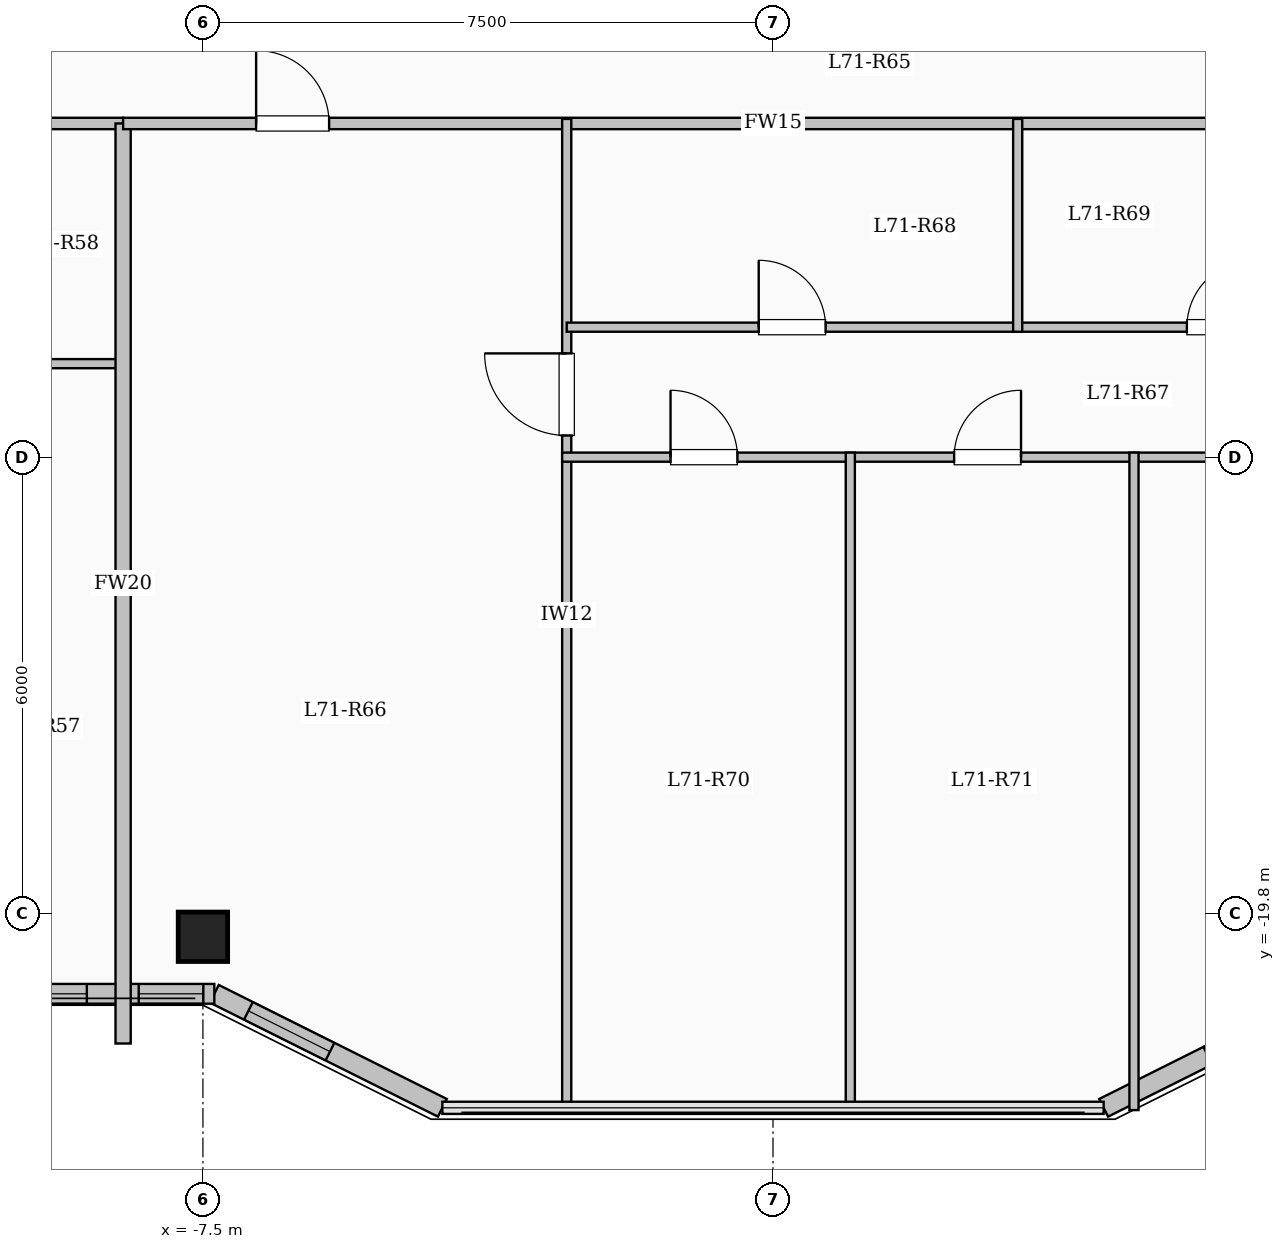
"""IFC4 building model, lengths in metres.
Left out: names, types, materials, properties, quantities, classifications, styles, units other than length and angle.
Written with IfcOpenShell. Run it as: python <this file> out.ifc"""

import sys

from ifc_helpers import new_model, si_unit, direction, frame, frame_2d, origin, origin_2d, place, context, subcontext, project, spatial, rectangle, extrude, element, fill, save


model = new_model("IFC4")
c1 = context("Model", 3, precision=1e-05, world=origin(), true_north=direction((0.0, 1.0)))
c2 = subcontext(c1, "Body", "Model", "MODEL_VIEW")
j1 = project(units=[si_unit("LENGTHUNIT", "METRE"), si_unit("PLANEANGLEUNIT", "RADIAN")], contexts=[c1])
p1 = place(None, origin())
s1 = spatial("IfcSite", under=j1, at=p1, CompositionType="ELEMENT")
p2 = place(p1, origin())
s2 = spatial("IfcBuilding", under=s1, at=p2, CompositionType="ELEMENT")
p3 = place(p2, frame((0.0, 0.0, 261.6)))
s3 = spatial("IfcBuildingStorey", under=s2, at=p3, CompositionType="ELEMENT", Elevation=261.6)
p4 = place(p3, frame((-7.5, -20.1, 0.0), z_axis=(0.0, 0.0, 1.0), x_axis=(1.0, 0.0, 0.0)))
e1 = element("IfcColumn", 1, at=p4, inside=s3, PredefinedType="COLUMN", context=c2, shape_type="SweptSolid", body=[
    extrude(rectangle(XDim=0.65, YDim=0.65, at=origin_2d()), origin(), (0.0, 0.0, 1.0), 3.35),
])
p5 = place(p3, frame((7.35, -20.85, 0.0), z_axis=(0.0, 0.0, 1.0), x_axis=(-0.894427191, -0.4472135955, 0.0)))
e2 = element("IfcWall", 2, at=p5, inside=s3, PredefinedType="SOLIDWALL", context=c2, shape_type="SweptSolid", body=[
    extrude(rectangle(XDim=3.354, YDim=0.26, at=frame_2d((1.677, 0.0))), origin(), (0.0, 0.0, 1.0), 3.1),
])
p6 = place(p5, frame((0.622, 0.0, 0.95)))
e3 = element("IfcOpeningElement", 3, at=p6, cuts=e2, PredefinedType="OPENING", context=c2, shape_type="SweptSolid", body=[
    extrude(rectangle(XDim=1.2, YDim=1.5, at=frame_2d((0.6, 0.75))), frame((0.0, 0.14, 0.0), z_axis=(0.0, -1.0, 0.0), x_axis=(1.0, 0.0, 0.0)), (0.0, 0.0, 1.0), 0.28),
])
p7 = place(p3, frame((-4.35, -22.35, 0.0), z_axis=(0.0, 0.0, 1.0), x_axis=(-0.894427191, 0.4472135955, 0.0)))
e4 = element("IfcWall", 4, at=p7, inside=s3, PredefinedType="SOLIDWALL", context=c2, shape_type="SweptSolid", body=[
    extrude(rectangle(XDim=3.354, YDim=0.26, at=frame_2d((1.677, 0.0))), origin(), (0.0, 0.0, 1.0), 3.1),
])
p8 = place(p7, frame((1.653, 0.0, 0.95)))
e5 = element("IfcOpeningElement", 5, at=p8, cuts=e4, PredefinedType="OPENING", context=c2, shape_type="SweptSolid", body=[
    extrude(rectangle(XDim=1.2, YDim=1.5, at=frame_2d((0.6, 0.75))), frame((0.0, 0.14, 0.0), z_axis=(0.0, -1.0, 0.0), x_axis=(1.0, 0.0, 0.0)), (0.0, 0.0, 1.0), 0.28),
])
p9 = place(p3, frame((-7.35, -20.85, 0.0), z_axis=(0.0, 0.0, 1.0), x_axis=(-1.0, 0.0, 0.0)))
e6 = element("IfcWall", 6, at=p9, inside=s3, PredefinedType="SOLIDWALL", context=c2, shape_type="SweptSolid", body=[
    extrude(rectangle(XDim=10.5, YDim=0.26, at=frame_2d((5.25, 0.0))), origin(), (0.0, 0.0, 1.0), 3.1),
])
p10 = place(p9, frame((0.145, 0.0, 0.95)))
e7 = element("IfcOpeningElement", 7, at=p10, cuts=e6, PredefinedType="OPENING", context=c2, shape_type="SweptSolid", body=[
    extrude(rectangle(XDim=0.85, YDim=1.5, at=frame_2d((0.425, 0.75))), frame((0.0, 0.14, 0.0), z_axis=(0.0, -1.0, 0.0), x_axis=(1.0, 0.0, 0.0)), (0.0, 0.0, 1.0), 0.28),
])
p11 = place(p9, frame((1.677, 0.0, 0.95)))
e8 = element("IfcOpeningElement", 8, at=p11, cuts=e6, PredefinedType="OPENING", context=c2, shape_type="SweptSolid", body=[
    extrude(rectangle(XDim=1.2, YDim=1.5, at=frame_2d((0.6, 0.75))), frame((0.0, 0.14, 0.0), z_axis=(0.0, -1.0, 0.0), x_axis=(1.0, 0.0, 0.0)), (0.0, 0.0, 1.0), 0.28),
])
p12 = place(p9, frame((4.0, 0.0, 0.95)))
e9 = element("IfcOpeningElement", 9, at=p12, cuts=e6, PredefinedType="OPENING", context=c2, shape_type="SweptSolid", body=[
    extrude(rectangle(XDim=1.2, YDim=1.5, at=frame_2d((0.6, 0.75))), frame((0.0, 0.14, 0.0), z_axis=(0.0, -1.0, 0.0), x_axis=(1.0, 0.0, 0.0)), (0.0, 0.0, 1.0), 0.28),
])
p13 = place(p9, frame((6.302, 0.0, 0.95)))
e10 = element("IfcOpeningElement", 10, at=p13, cuts=e6, PredefinedType="OPENING", context=c2, shape_type="SweptSolid", body=[
    extrude(rectangle(XDim=1.2, YDim=1.5, at=frame_2d((0.6, 0.75))), frame((0.0, 0.14, 0.0), z_axis=(0.0, -1.0, 0.0), x_axis=(1.0, 0.0, 0.0)), (0.0, 0.0, 1.0), 0.28),
])
p14 = place(p9, frame((8.575, 0.0, 0.95)))
e11 = element("IfcOpeningElement", 11, at=p14, cuts=e6, PredefinedType="OPENING", context=c2, shape_type="SweptSolid", body=[
    extrude(rectangle(XDim=1.2, YDim=1.5, at=frame_2d((0.6, 0.75))), frame((0.0, 0.14, 0.0), z_axis=(0.0, -1.0, 0.0), x_axis=(1.0, 0.0, 0.0)), (0.0, 0.0, 1.0), 0.28),
])
p15 = place(p3, frame((-17.75, -9.4, 0.0), z_axis=(0.0, 0.0, 1.0), x_axis=(1.0, 0.0, 0.0)))
e12 = element("IfcWall", 12, at=p15, inside=s3, PredefinedType="PARTITIONING", context=c2, shape_type="SweptSolid", body=[
    extrude(rectangle(XDim=9.2, YDim=0.15, at=frame_2d((4.6, 0.0))), origin(), (0.0, 0.0, 1.0), 3.1),
])
p16 = place(p15, frame((0.7, 0.0, 0.0)))
e13 = element("IfcOpeningElement", 13, at=p16, cuts=e12, PredefinedType="OPENING", context=c2, shape_type="SweptSolid", body=[
    extrude(rectangle(XDim=0.96, YDim=2.15, at=frame_2d((0.48, 1.075))), frame((0.0, 0.085, 0.0), z_axis=(0.0, -1.0, 0.0), x_axis=(1.0, 0.0, 0.0)), (0.0, 0.0, 1.0), 0.17),
])
p17 = place(p15, frame((5.275, 0.0, 0.0)))
e14 = element("IfcOpeningElement", 14, at=p17, cuts=e12, PredefinedType="OPENING", context=c2, shape_type="SweptSolid", body=[
    extrude(rectangle(XDim=0.96, YDim=2.15, at=frame_2d((0.48, 1.075))), frame((0.0, 0.085, 0.0), z_axis=(0.0, -1.0, 0.0), x_axis=(1.0, 0.0, 0.0)), (0.0, 0.0, 1.0), 0.17),
])
p18 = place(p3, frame((-10.775, -12.56, 0.0), z_axis=(0.0, 0.0, 1.0), x_axis=(1.0, 0.0, 0.0)))
e15 = element("IfcWall", 15, at=p18, inside=s3, PredefinedType="PARTITIONING", context=c2, shape_type="SweptSolid", body=[
    extrude(rectangle(XDim=2.235, YDim=0.12, at=frame_2d((1.117, 0.0))), origin(), (0.0, 0.0, 1.0), 2.785),
])
p19 = place(p3, frame((-8.55, -21.504, 0.0), z_axis=(0.0, 0.0, 1.0), x_axis=(0.0, 1.0, 0.0)))
e16 = element("IfcWall", 16, at=p19, inside=s3, PredefinedType="SOLIDWALL", context=c2, shape_type="SweptSolid", body=[
    extrude(rectangle(XDim=12.104, YDim=0.2, at=frame_2d((6.052, 0.0))), origin(), (0.0, 0.0, 1.0), 3.1),
])
p20 = place(p3, frame((-8.55, -9.4, 0.0), z_axis=(0.0, 0.0, 1.0), x_axis=(1.0, 0.0, 0.0)))
e17 = element("IfcWall", 17, at=p20, inside=s3, PredefinedType="PARTITIONING", context=c2, shape_type="SweptSolid", body=[
    extrude(rectangle(XDim=17.1, YDim=0.15, at=frame_2d((8.55, 0.0))), origin(), (0.0, 0.0, 1.0), 3.1),
])
p21 = place(p20, frame((1.75, 0.0, 0.0)))
e18 = element("IfcOpeningElement", 18, at=p21, cuts=e17, PredefinedType="OPENING", context=c2, shape_type="SweptSolid", body=[
    extrude(rectangle(XDim=0.96, YDim=2.15, at=frame_2d((0.48, 1.075))), frame((0.0, 0.085, 0.0), z_axis=(0.0, -1.0, 0.0), x_axis=(1.0, 0.0, 0.0)), (0.0, 0.0, 1.0), 0.17),
])
p22 = place(p3, frame((-2.714, -22.38, 0.0), z_axis=(0.0, 0.0, 1.0), x_axis=(0.0, 1.0, 0.0)))
e19 = element("IfcWall", 19, at=p22, inside=s3, PredefinedType="PARTITIONING", context=c2, shape_type="SweptSolid", body=[
    extrude(rectangle(XDim=13.04, YDim=0.12, at=frame_2d((6.52, 0.0))), origin(), (0.0, 0.0, 1.0), 3.1),
])
p23 = place(p22, frame((8.875, 0.0, 0.0)))
e20 = element("IfcOpeningElement", 20, at=p23, cuts=e19, PredefinedType="OPENING", context=c2, shape_type="SweptSolid", body=[
    extrude(rectangle(XDim=1.08, YDim=2.15, at=frame_2d((0.54, 1.075))), frame((0.0, 0.07, 0.0), z_axis=(0.0, -1.0, 0.0), x_axis=(1.0, 0.0, 0.0)), (0.0, 0.0, 1.0), 0.14),
])
p24 = place(p3, frame((-2.714, -12.08, 0.0), z_axis=(0.0, 0.0, 1.0), x_axis=(1.0, 0.0, 0.0)))
e21 = element("IfcWall", 21, at=p24, inside=s3, PredefinedType="PARTITIONING", context=c2, shape_type="SweptSolid", body=[
    extrude(rectangle(XDim=5.933, YDim=0.12, at=frame_2d((2.967, 0.0))), origin(), (0.0, 0.0, 1.0), 2.785),
])
p25 = place(p24, frame((2.526, 0.0, 0.0)))
e22 = element("IfcOpeningElement", 22, at=p25, cuts=e21, PredefinedType="OPENING", context=c2, shape_type="SweptSolid", body=[
    extrude(rectangle(XDim=0.88, YDim=2.1, at=frame_2d((0.44, 1.05))), frame((0.0, 0.07, 0.0), z_axis=(0.0, -1.0, 0.0), x_axis=(1.0, 0.0, 0.0)), (0.0, 0.0, 1.0), 0.14),
])
p26 = place(p3, frame((3.219, -12.08, 0.0), z_axis=(0.0, 0.0, 1.0), x_axis=(1.0, 0.0, 0.0)))
e23 = element("IfcWall", 23, at=p26, inside=s3, PredefinedType="PARTITIONING", context=c2, shape_type="SweptSolid", body=[
    extrude(rectangle(XDim=5.331, YDim=0.12, at=frame_2d((2.666, 0.0))), origin(), (0.0, 0.0, 1.0), 2.785),
])
p27 = place(p26, frame((2.226, 0.0, 0.0)))
e24 = element("IfcOpeningElement", 24, at=p27, cuts=e23, PredefinedType="OPENING", context=c2, shape_type="SweptSolid", body=[
    extrude(rectangle(XDim=0.88, YDim=2.1, at=frame_2d((0.44, 1.05))), frame((0.0, 0.07, 0.0), z_axis=(0.0, -1.0, 0.0), x_axis=(1.0, 0.0, 0.0)), (0.0, 0.0, 1.0), 0.14),
])
p28 = place(p3, frame((-2.774, -13.79, 0.0), z_axis=(0.0, 0.0, 1.0), x_axis=(1.0, 0.0, 0.0)))
e25 = element("IfcWall", 25, at=p28, inside=s3, PredefinedType="PARTITIONING", context=c2, shape_type="SweptSolid", body=[
    extrude(rectangle(XDim=11.384, YDim=0.12, at=frame_2d((5.692, 0.0))), origin(), (0.0, 0.0, 1.0), 2.785),
])
p29 = place(p28, frame((1.426, 0.0, 0.0)))
e26 = element("IfcOpeningElement", 26, at=p29, cuts=e25, PredefinedType="OPENING", context=c2, shape_type="SweptSolid", body=[
    extrude(rectangle(XDim=0.88, YDim=2.1, at=frame_2d((0.44, 1.05))), frame((0.0, 0.07, 0.0), z_axis=(0.0, -1.0, 0.0), x_axis=(1.0, 0.0, 0.0)), (0.0, 0.0, 1.0), 0.14),
])
p30 = place(p28, frame((5.157, 0.0, 0.0)))
e27 = element("IfcOpeningElement", 27, at=p30, cuts=e25, PredefinedType="OPENING", context=c2, shape_type="SweptSolid", body=[
    extrude(rectangle(XDim=0.88, YDim=2.1, at=frame_2d((0.44, 1.05))), frame((0.0, 0.07, 0.0), z_axis=(0.0, -1.0, 0.0), x_axis=(1.0, 0.0, 0.0)), (0.0, 0.0, 1.0), 0.14),
])
p31 = place(p28, frame((8.888, 0.0, 0.0)))
e28 = element("IfcOpeningElement", 28, at=p31, cuts=e25, PredefinedType="OPENING", context=c2, shape_type="SweptSolid", body=[
    extrude(rectangle(XDim=0.88, YDim=2.1, at=frame_2d((0.44, 1.05))), frame((0.0, 0.07, 0.0), z_axis=(0.0, -1.0, 0.0), x_axis=(1.0, 0.0, 0.0)), (0.0, 0.0, 1.0), 0.14),
])
p32 = place(p3, frame((3.219, -12.14, 0.0), z_axis=(0.0, 0.0, 1.0), x_axis=(0.0, 1.0, 0.0)))
e29 = element("IfcWall", 29, at=p32, inside=s3, PredefinedType="PARTITIONING", context=c2, shape_type="SweptSolid", body=[
    extrude(rectangle(XDim=2.8, YDim=0.12, at=frame_2d((1.4, 0.0))), origin(), (0.0, 0.0, 1.0), 3.1),
])
for number, where, z_axis, x_axis in (
    (30, (1.017, -22.38, 0.0), (0.0, 0.0, 1.0), (0.0, 1.0, 0.0)),
    (31, (4.749, -22.38, 0.0), (0.0, 0.0, 1.0), (0.0, 1.0, 0.0)),
):
    element("IfcWall", number, at=place(p3, frame(where, z_axis=z_axis, x_axis=x_axis)), inside=s3, PredefinedType="PARTITIONING", context=c2, shape_type="SweptSolid", body=[
        extrude(rectangle(XDim=8.65, YDim=0.12, at=frame_2d((4.325, 0.0))), origin(), (0.0, 0.0, 1.0), 3.1),
    ])
p33 = place(p8, origin())
e32 = element("IfcWindow", 32, at=p33, inside=s3, PartitioningType="SINGLE_PANEL", PredefinedType="WINDOW", context=c2, shape_type="SweptSolid", body=[
    extrude(rectangle(XDim=1.2, YDim=1.5, at=frame_2d((0.6, 0.75))), frame((0.0, 0.03, 0.0), z_axis=(0.0, -1.0, 0.0), x_axis=(1.0, 0.0, 0.0)), (0.0, 0.0, 1.0), 0.06),
])
fill(e5, e32)
p34 = place(p10, origin())
e33 = element("IfcWindow", 33, at=p34, inside=s3, PartitioningType="SINGLE_PANEL", PredefinedType="WINDOW", context=c2, shape_type="SweptSolid", body=[
    extrude(rectangle(XDim=0.85, YDim=1.5, at=frame_2d((0.425, 0.75))), frame((0.0, 0.03, 0.0), z_axis=(0.0, -1.0, 0.0), x_axis=(1.0, 0.0, 0.0)), (0.0, 0.0, 1.0), 0.06),
])
fill(e7, e33)
p35 = place(p11, origin())
e34 = element("IfcWindow", 34, at=p35, inside=s3, PartitioningType="SINGLE_PANEL", PredefinedType="WINDOW", context=c2, shape_type="SweptSolid", body=[
    extrude(rectangle(XDim=1.2, YDim=1.5, at=frame_2d((0.6, 0.75))), frame((0.0, 0.03, 0.0), z_axis=(0.0, -1.0, 0.0), x_axis=(1.0, 0.0, 0.0)), (0.0, 0.0, 1.0), 0.06),
])
fill(e8, e34)
p36 = place(p21, origin())
e35 = element("IfcDoor", 35, at=p36, inside=s3, OperationType="SINGLE_SWING_LEFT", PredefinedType="DOOR", context=c2, shape_type="SweptSolid", body=[
    extrude(rectangle(XDim=0.96, YDim=2.15, at=frame_2d((0.48, 1.075))), frame((0.0, 0.025, 0.0), z_axis=(0.0, -1.0, 0.0), x_axis=(1.0, 0.0, 0.0)), (0.0, 0.0, 1.0), 0.05),
])
fill(e18, e35)
p37 = place(p23, origin())
e36 = element("IfcDoor", 36, at=p37, inside=s3, OperationType="SINGLE_SWING_RIGHT", PredefinedType="DOOR", context=c2, shape_type="SweptSolid", body=[
    extrude(rectangle(XDim=1.08, YDim=2.15, at=frame_2d((0.54, 1.075))), frame((0.0, 0.025, 0.0), z_axis=(0.0, -1.0, 0.0), x_axis=(1.0, 0.0, 0.0)), (0.0, 0.0, 1.0), 0.05),
])
fill(e20, e36)
p38 = place(p25, origin())
e37 = element("IfcDoor", 37, at=p38, inside=s3, OperationType="SINGLE_SWING_LEFT", PredefinedType="DOOR", context=c2, shape_type="SweptSolid", body=[
    extrude(rectangle(XDim=0.88, YDim=2.1, at=frame_2d((0.44, 1.05))), frame((0.0, 0.025, 0.0), z_axis=(0.0, -1.0, 0.0), x_axis=(1.0, 0.0, 0.0)), (0.0, 0.0, 1.0), 0.05),
])
fill(e22, e37)
p39 = place(p27, origin())
e38 = element("IfcDoor", 38, at=p39, inside=s3, OperationType="SINGLE_SWING_RIGHT", PredefinedType="DOOR", context=c2, shape_type="SweptSolid", body=[
    extrude(rectangle(XDim=0.88, YDim=2.1, at=frame_2d((0.44, 1.05))), frame((0.0, 0.025, 0.0), z_axis=(0.0, -1.0, 0.0), x_axis=(1.0, 0.0, 0.0)), (0.0, 0.0, 1.0), 0.05),
])
fill(e24, e38)
p40 = place(p29, origin())
e39 = element("IfcDoor", 39, at=p40, inside=s3, OperationType="SINGLE_SWING_LEFT", PredefinedType="DOOR", context=c2, shape_type="SweptSolid", body=[
    extrude(rectangle(XDim=0.88, YDim=2.1, at=frame_2d((0.44, 1.05))), frame((0.0, 0.025, 0.0), z_axis=(0.0, -1.0, 0.0), x_axis=(1.0, 0.0, 0.0)), (0.0, 0.0, 1.0), 0.05),
])
fill(e26, e39)
p41 = place(p30, origin())
e40 = element("IfcDoor", 40, at=p41, inside=s3, OperationType="SINGLE_SWING_RIGHT", PredefinedType="DOOR", context=c2, shape_type="SweptSolid", body=[
    extrude(rectangle(XDim=0.88, YDim=2.1, at=frame_2d((0.44, 1.05))), frame((0.0, 0.025, 0.0), z_axis=(0.0, -1.0, 0.0), x_axis=(1.0, 0.0, 0.0)), (0.0, 0.0, 1.0), 0.05),
])
fill(e27, e40)
save(model, sys.argv[1])
